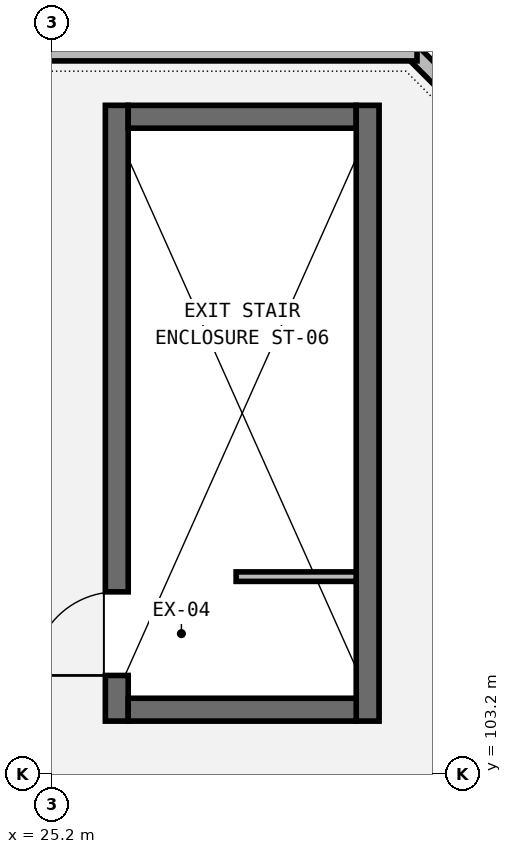
"""IFC4 building model, lengths in metres.
Left out: names, types, materials, properties, quantities, classifications, styles, units other than length and angle.
Written with IfcOpenShell. Run it as: python <this file> out.ifc"""

import sys

from ifc_helpers import new_model, si_unit, direction, frame, frame_2d, origin, place, context, subcontext, project, spatial, rectangle, extrude, element, fill, save


model = new_model("IFC4")
c1 = context("Model", 3, precision=1e-05, world=origin(), true_north=direction((0.0, 1.0)))
c2 = subcontext(c1, "Body", "Model", "MODEL_VIEW")
j1 = project(units=[si_unit("LENGTHUNIT", "METRE"), si_unit("PLANEANGLEUNIT", "RADIAN")], contexts=[c1])
p1 = place(None, origin())
s1 = spatial("IfcSite", under=j1, at=p1, CompositionType="ELEMENT")
p2 = place(p1, origin())
s2 = spatial("IfcBuilding", under=s1, at=p2, CompositionType="ELEMENT")
p3 = place(p2, frame((0.0, 0.0, 28.0)))
s3 = spatial("IfcBuildingStorey", under=s2, at=p3, CompositionType="ELEMENT", Elevation=28.0)
p4 = place(p3, frame((26.05, 103.9, 0.0), z_axis=(0.0, 0.0, 1.0), x_axis=(0.0, 1.0, 0.0)))
e1 = element("IfcWall", 1, at=p4, inside=s3, PredefinedType="SHEAR", context=c2, shape_type="SweptSolid", body=[
    extrude(rectangle(XDim=8.1, YDim=0.3, at=frame_2d((4.05, 0.0))), origin(), (0.0, 0.0, 1.0), 3.2),
])
p5 = place(p4, frame((0.6, 0.0, 0.0)))
e2 = element("IfcOpeningElement", 2, at=p5, cuts=e1, PredefinedType="OPENING", context=c2, shape_type="SweptSolid", body=[
    extrude(rectangle(XDim=1.1, YDim=2.15, at=frame_2d((0.55, 1.075))), frame((0.0, 0.16, 0.0), z_axis=(0.0, -1.0, 0.0), x_axis=(1.0, 0.0, 0.0)), (0.0, 0.0, 1.0), 0.32),
])
p6 = place(p3, frame((26.2, 111.85, 0.0), z_axis=(0.0, 0.0, 1.0), x_axis=(1.0, 0.0, 0.0)))
e3 = element("IfcWall", 3, at=p6, inside=s3, PredefinedType="SHEAR", context=c2, shape_type="SweptSolid", body=[
    extrude(rectangle(XDim=3.0, YDim=0.3, at=frame_2d((1.5, 0.0))), origin(), (0.0, 0.0, 1.0), 3.2),
])
p7 = place(p3, frame((29.35, 112.0, 0.0), z_axis=(0.0, 0.0, 1.0), x_axis=(0.0, -1.0, 0.0)))
e4 = element("IfcWall", 4, at=p7, inside=s3, PredefinedType="SHEAR", context=c2, shape_type="SweptSolid", body=[
    extrude(rectangle(XDim=8.1, YDim=0.3, at=frame_2d((4.05, 0.0))), origin(), (0.0, 0.0, 1.0), 3.2),
])
p8 = place(p3, frame((29.2, 104.05, 0.0), z_axis=(0.0, 0.0, 1.0), x_axis=(-1.0, 0.0, 0.0)))
e5 = element("IfcWall", 5, at=p8, inside=s3, PredefinedType="SHEAR", context=c2, shape_type="SweptSolid", body=[
    extrude(rectangle(XDim=3.0, YDim=0.3, at=frame_2d((1.5, 0.0))), origin(), (0.0, 0.0, 1.0), 3.2),
])
p9 = place(p3, frame((34.722, 107.922, 0.0), z_axis=(0.0, 0.0, 1.0), x_axis=(-0.707106781187, 0.707106781187, 0.0)))
e6 = element("IfcWall", 6, at=p9, inside=s3, PredefinedType="PARAPET", context=c2, shape_type="SweptSolid", body=[
    extrude(rectangle(XDim=6.788, YDim=0.21, at=frame_2d((3.394, 0.0))), origin(), (0.0, 0.0, 1.0), 1.2),
])
p10 = place(p3, frame((30.0, 112.69, 0.0), z_axis=(0.0, 0.0, 1.0), x_axis=(-1.0, 0.0, 0.0)))
e7 = element("IfcWall", 7, at=p10, inside=s3, PredefinedType="PARAPET", context=c2, shape_type="SweptSolid", body=[
    extrude(rectangle(XDim=19.2, YDim=0.21, at=frame_2d((9.6, 0.0))), origin(), (0.0, 0.0, 1.0), 1.2),
])
p11 = place(p3, frame((29.2, 105.8, 0.0), z_axis=(0.0, 0.0, 1.0), x_axis=(-1.0, 0.0, 0.0)))
e8 = element("IfcWall", 8, at=p11, inside=s3, PredefinedType="PARTITIONING", context=c2, shape_type="SweptSolid", body=[
    extrude(rectangle(XDim=1.58, YDim=0.125, at=frame_2d((0.79, 0.0))), origin(), (0.0, 0.0, 1.0), 1.15),
])
p12 = place(p5, origin())
e9 = element("IfcDoor", 9, at=p12, inside=s3, OperationType="SINGLE_SWING_LEFT", PredefinedType="DOOR", context=c2, shape_type="SweptSolid", body=[
    extrude(rectangle(XDim=1.1, YDim=2.15, at=frame_2d((0.55, 1.075))), frame((0.0, 0.025, 0.0), z_axis=(0.0, -1.0, 0.0), x_axis=(1.0, 0.0, 0.0)), (0.0, 0.0, 1.0), 0.05),
])
fill(e2, e9)
save(model, sys.argv[1])
